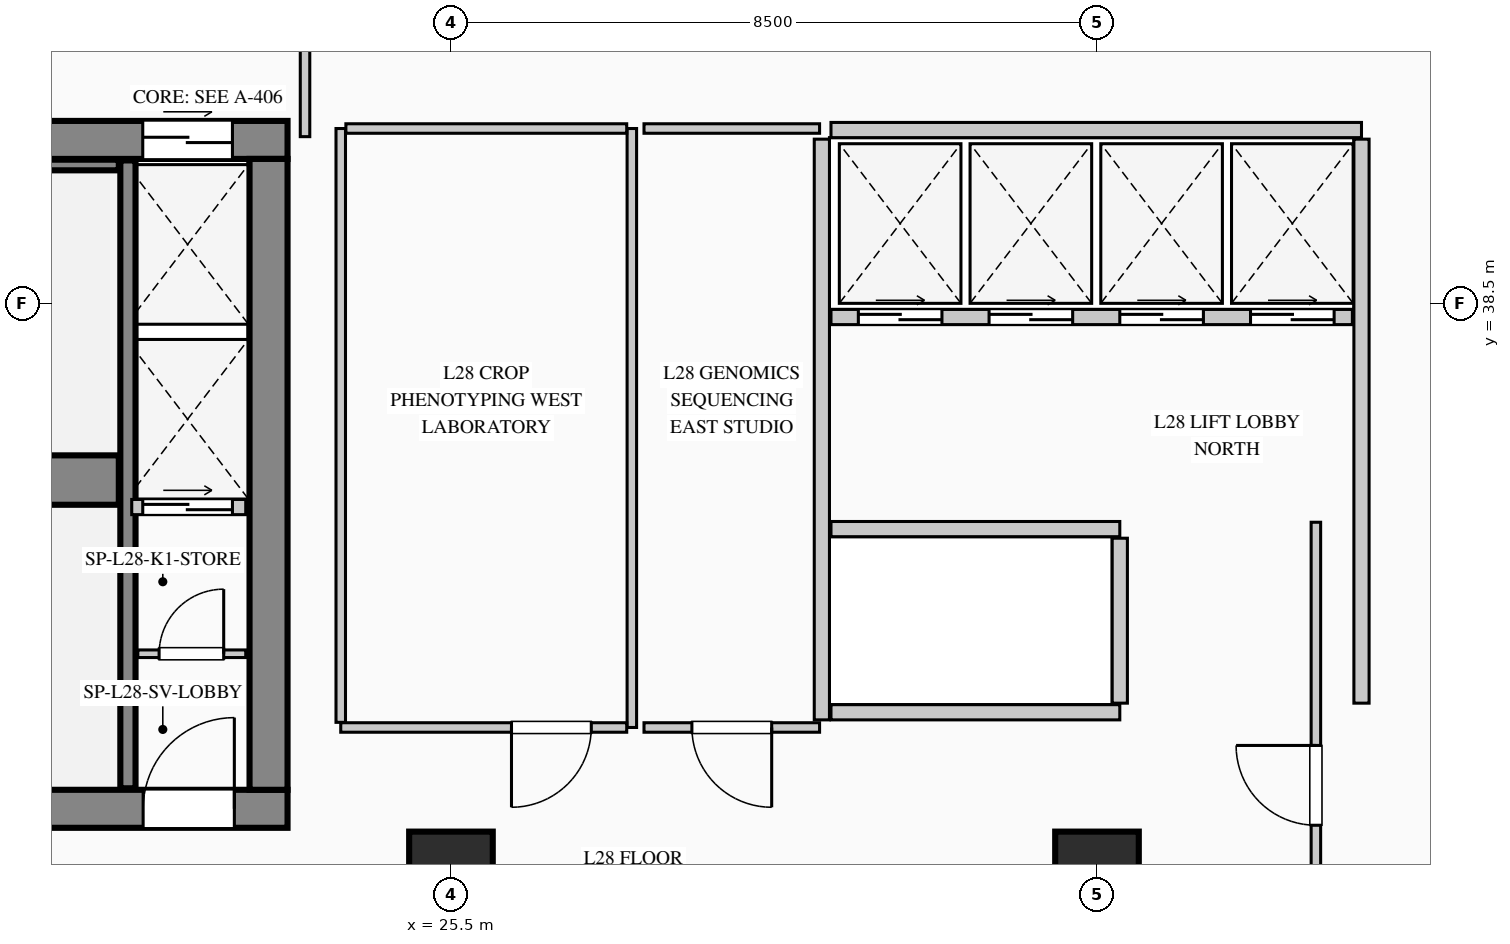
"""IFC4 building model, lengths in metres.
Left out: names, types, materials, properties, quantities, classifications, styles, units other than length and angle.
Written with IfcOpenShell. Run it as: python <this file> out.ifc"""

import sys

from ifc_helpers import new_model, si_unit, direction, frame, frame_2d, origin, origin_2d, place, context, subcontext, project, spatial, rectangle, extrude, element, fill, save


model = new_model("IFC4")
c1 = context("Model", 3, precision=1e-05, world=origin(), true_north=direction((0.0, 1.0)))
c2 = subcontext(c1, "Body", "Model", "MODEL_VIEW")
j1 = project(units=[si_unit("LENGTHUNIT", "METRE"), si_unit("PLANEANGLEUNIT", "RADIAN")], contexts=[c1])
p1 = place(None, origin())
s1 = spatial("IfcSite", under=j1, at=p1, CompositionType="ELEMENT")
p2 = place(p1, origin())
s2 = spatial("IfcBuilding", under=s1, at=p2, CompositionType="ELEMENT")
p3 = place(p2, frame((0.0, 0.0, 123.25)))
s3 = spatial("IfcBuildingStorey", under=s2, at=p3, CompositionType="ELEMENT", Elevation=123.25)
p4 = place(p3, frame((5.5, 40.65, 0.0), z_axis=(0.0, 0.0, 1.0), x_axis=(1.0, 0.0, 0.0)))
e1 = element("IfcWall", 1, at=p4, inside=s3, PredefinedType="SHEAR", context=c2, shape_type="SweptSolid", body=[
    extrude(rectangle(XDim=17.85, YDim=0.5, at=frame_2d((8.925, 0.0))), origin(), (0.0, 0.0, 1.0), 3.95),
])
p5 = place(p4, frame((15.945, 0.0, 0.0)))
e2 = element("IfcOpeningElement", 2, at=p5, cuts=e1, PredefinedType="OPENING", context=c2, shape_type="SweptSolid", body=[
    extrude(rectangle(XDim=1.18, YDim=2.25, at=frame_2d((0.59, 1.125))), frame((0.0, 0.26, 0.0), z_axis=(0.0, -1.0, 0.0), x_axis=(1.0, 0.0, 0.0)), (0.0, 0.0, 1.0), 0.52),
])
p6 = place(p3, frame((5.5, 31.85, 0.0), z_axis=(0.0, 0.0, 1.0), x_axis=(1.0, 0.0, 0.0)))
e3 = element("IfcWall", 3, at=p6, inside=s3, PredefinedType="SHEAR", context=c2, shape_type="SweptSolid", body=[
    extrude(rectangle(XDim=17.85, YDim=0.5, at=frame_2d((8.925, 0.0))), origin(), (0.0, 0.0, 1.0), 3.95),
])
p7 = place(p6, frame((3.15, 0.0, 0.0)))
e4 = element("IfcOpeningElement", 4, at=p7, cuts=e3, PredefinedType="OPENING", context=c2, shape_type="SweptSolid", body=[
    extrude(rectangle(XDim=1.2, YDim=2.2, at=frame_2d((0.6, 1.1))), frame((0.0, 0.26, 0.0), z_axis=(0.0, -1.0, 0.0), x_axis=(1.0, 0.0, 0.0)), (0.0, 0.0, 1.0), 0.52),
])
p8 = place(p6, frame((7.0, 0.0, 0.0)))
e5 = element("IfcOpeningElement", 5, at=p8, cuts=e3, PredefinedType="OPENING", context=c2, shape_type="SweptSolid", body=[
    extrude(rectangle(XDim=1.2, YDim=2.2, at=frame_2d((0.6, 1.1))), frame((0.0, 0.26, 0.0), z_axis=(0.0, -1.0, 0.0), x_axis=(1.0, 0.0, 0.0)), (0.0, 0.0, 1.0), 0.52),
])
p9 = place(p6, frame((8.85, 0.0, 0.0)))
e6 = element("IfcOpeningElement", 6, at=p9, cuts=e3, PredefinedType="OPENING", context=c2, shape_type="SweptSolid", body=[
    extrude(rectangle(XDim=1.15, YDim=2.2, at=frame_2d((0.575, 1.1))), frame((0.0, 0.26, 0.0), z_axis=(0.0, -1.0, 0.0), x_axis=(1.0, 0.0, 0.0)), (0.0, 0.0, 1.0), 0.52),
])
p10 = place(p6, frame((15.95, 0.0, 0.0)))
e7 = element("IfcOpeningElement", 7, at=p10, cuts=e3, PredefinedType="OPENING", context=c2, shape_type="SweptSolid", body=[
    extrude(rectangle(XDim=1.2, YDim=2.2, at=frame_2d((0.6, 1.1))), frame((0.0, 0.26, 0.0), z_axis=(0.0, -1.0, 0.0), x_axis=(1.0, 0.0, 0.0)), (0.0, 0.0, 1.0), 0.52),
])
p11 = place(p3, frame((23.1, 32.1, 0.0), z_axis=(0.0, 0.0, 1.0), x_axis=(0.0, 1.0, 0.0)))
e8 = element("IfcWall", 8, at=p11, inside=s3, PredefinedType="SHEAR", context=c2, shape_type="SweptSolid", body=[
    extrude(rectangle(XDim=8.3, YDim=0.5, at=frame_2d((4.15, 0.0))), origin(), (0.0, 0.0, 1.0), 3.95),
])
p12 = place(p3, frame((14.12, 36.175, 0.0), z_axis=(0.0, 0.0, 1.0), x_axis=(1.0, 0.0, 0.0)))
e9 = element("IfcWall", 9, at=p12, inside=s3, PredefinedType="SHEAR", context=c2, shape_type="SweptSolid", body=[
    extrude(rectangle(XDim=7.01, YDim=0.65, at=frame_2d((3.505, 0.0))), origin(), (0.0, 0.0, 1.0), 3.95),
])
p13 = place(p3, frame((21.25, 32.12, 0.0), z_axis=(0.0, 0.0, 1.0), x_axis=(0.0, 1.0, 0.0)))
e10 = element("IfcWall", 10, at=p13, inside=s3, PredefinedType="SHEAR", context=c2, shape_type="SweptSolid", body=[
    extrude(rectangle(XDim=8.26, YDim=0.2, at=frame_2d((4.13, 0.0))), origin(), (0.0, 0.0, 1.0), 3.95),
])
p14 = place(p3, frame((14.12, 40.32, 0.0), z_axis=(0.0, 0.0, 1.0), x_axis=(1.0, 0.0, 0.0)))
e11 = element("IfcWall", 11, at=p14, inside=s3, PredefinedType="SHEAR", context=c2, shape_type="SweptSolid", body=[
    extrude(rectangle(XDim=7.01, YDim=0.14, at=frame_2d((3.505, 0.0))), origin(), (0.0, 0.0, 1.0), 3.95),
])
for number, where, z_axis, x_axis in (
    (12, (25.5, 31.0, 0.0), (0.0, 0.0, 1.0), (1.0, 0.0, 0.0)),
    (13, (34.0, 31.0, 0.0), (0.0, 0.0, 1.0), (1.0, 0.0, 0.0)),
):
    element("IfcColumn", number, at=place(p3, frame(where, z_axis=z_axis, x_axis=x_axis)), inside=s3, PredefinedType="COLUMN", context=c2, shape_type="SweptSolid", body=[
        extrude(rectangle(XDim=1.1, YDim=1.1, at=origin_2d()), origin(), (0.0, 0.0, 1.0), 3.95),
    ])
p15 = place(p3, frame((21.38, 33.89, 0.0), z_axis=(0.0, 0.0, 1.0), x_axis=(1.0, 0.0, 0.0)))
e14 = element("IfcWall", 14, at=p15, inside=s3, PredefinedType="PARTITIONING", context=c2, shape_type="SweptSolid", body=[
    extrude(rectangle(XDim=1.42, YDim=0.1, at=frame_2d((0.71, 0.0))), origin(), (0.0, 0.0, 1.0), 3.69),
])
p16 = place(p15, frame((0.28, 0.0, 0.0)))
e15 = element("IfcOpeningElement", 15, at=p16, cuts=e14, PredefinedType="OPENING", context=c2, shape_type="SweptSolid", body=[
    extrude(rectangle(XDim=0.85, YDim=2.1, at=frame_2d((0.425, 1.05))), frame((0.0, 0.06, 0.0), z_axis=(0.0, -1.0, 0.0), x_axis=(1.0, 0.0, 0.0)), (0.0, 0.0, 1.0), 0.12),
])
p17 = place(p3, frame((21.3, 35.82, 0.0), z_axis=(0.0, 0.0, 1.0), x_axis=(1.0, 0.0, 0.0)))
e16 = element("IfcWall", 16, at=p17, inside=s3, PredefinedType="PARTITIONING", context=c2, shape_type="SweptSolid", body=[
    extrude(rectangle(XDim=1.5, YDim=0.2, at=frame_2d((0.75, 0.0))), origin(), (0.0, 0.0, 1.0), 3.69),
])
p18 = place(p17, frame((0.145, 0.0, 0.0)))
e17 = element("IfcOpeningElement", 17, at=p18, cuts=e16, PredefinedType="OPENING", context=c2, shape_type="SweptSolid", body=[
    extrude(rectangle(XDim=1.18, YDim=2.25, at=frame_2d((0.59, 1.125))), frame((0.0, 0.11, 0.0), z_axis=(0.0, -1.0, 0.0), x_axis=(1.0, 0.0, 0.0)), (0.0, 0.0, 1.0), 0.22),
])
p19 = place(p3, frame((30.38, 33.02, 0.0), z_axis=(0.0, 0.0, 1.0), x_axis=(0.0, 1.0, 0.0)))
e18 = element("IfcWall", 18, at=p19, inside=s3, PredefinedType="PARTITIONING", context=c2, shape_type="SweptSolid", body=[
    extrude(rectangle(XDim=7.64, YDim=0.2, at=frame_2d((3.82, 0.0))), origin(), (0.0, 0.0, 1.0), 3.69),
])
p20 = place(p3, frame((30.5, 40.78, 0.0), z_axis=(0.0, 0.0, 1.0), x_axis=(1.0, 0.0, 0.0)))
e19 = element("IfcWall", 19, at=p20, inside=s3, PredefinedType="PARTITIONING", context=c2, shape_type="SweptSolid", body=[
    extrude(rectangle(XDim=6.98, YDim=0.2, at=frame_2d((3.49, 0.0))), origin(), (0.0, 0.0, 1.0), 3.69),
])
p21 = place(p3, frame((37.48, 33.24, 0.0), z_axis=(0.0, 0.0, 1.0), x_axis=(0.0, 1.0, 0.0)))
e20 = element("IfcWall", 20, at=p21, inside=s3, PredefinedType="PARTITIONING", context=c2, shape_type="SweptSolid", body=[
    extrude(rectangle(XDim=7.42, YDim=0.2, at=frame_2d((3.71, 0.0))), origin(), (0.0, 0.0, 1.0), 3.69),
])
p22 = place(p3, frame((30.5, 38.32, 0.0), z_axis=(0.0, 0.0, 1.0), x_axis=(1.0, 0.0, 0.0)))
e21 = element("IfcWall", 21, at=p22, inside=s3, PredefinedType="PARTITIONING", context=c2, shape_type="SweptSolid", body=[
    extrude(rectangle(XDim=6.86, YDim=0.2, at=frame_2d((3.43, 0.0))), origin(), (0.0, 0.0, 1.0), 3.69),
])
p23 = place(p22, frame((0.36, 0.0, 0.0)))
e22 = element("IfcOpeningElement", 22, at=p23, cuts=e21, PredefinedType="OPENING", context=c2, shape_type="SweptSolid", body=[
    extrude(rectangle(XDim=1.1, YDim=2.2, at=frame_2d((0.55, 1.1))), frame((0.0, 0.11, 0.0), z_axis=(0.0, -1.0, 0.0), x_axis=(1.0, 0.0, 0.0)), (0.0, 0.0, 1.0), 0.22),
])
p24 = place(p22, frame((2.08, 0.0, 0.0)))
e23 = element("IfcOpeningElement", 23, at=p24, cuts=e21, PredefinedType="OPENING", context=c2, shape_type="SweptSolid", body=[
    extrude(rectangle(XDim=1.1, YDim=2.2, at=frame_2d((0.55, 1.1))), frame((0.0, 0.11, 0.0), z_axis=(0.0, -1.0, 0.0), x_axis=(1.0, 0.0, 0.0)), (0.0, 0.0, 1.0), 0.22),
])
p25 = place(p22, frame((3.8, 0.0, 0.0)))
e24 = element("IfcOpeningElement", 24, at=p25, cuts=e21, PredefinedType="OPENING", context=c2, shape_type="SweptSolid", body=[
    extrude(rectangle(XDim=1.1, YDim=2.2, at=frame_2d((0.55, 1.1))), frame((0.0, 0.11, 0.0), z_axis=(0.0, -1.0, 0.0), x_axis=(1.0, 0.0, 0.0)), (0.0, 0.0, 1.0), 0.22),
])
p26 = place(p22, frame((5.52, 0.0, 0.0)))
e25 = element("IfcOpeningElement", 25, at=p26, cuts=e21, PredefinedType="OPENING", context=c2, shape_type="SweptSolid", body=[
    extrude(rectangle(XDim=1.1, YDim=2.2, at=frame_2d((0.55, 1.1))), frame((0.0, 0.11, 0.0), z_axis=(0.0, -1.0, 0.0), x_axis=(1.0, 0.0, 0.0)), (0.0, 0.0, 1.0), 0.22),
])
for number, where, z_axis, x_axis in (
    (26, (30.5, 35.53, 0.0), (0.0, 0.0, 1.0), (1.0, 0.0, 0.0)),
    (27, (30.5, 33.12, 0.0), (0.0, 0.0, 1.0), (1.0, 0.0, 0.0)),
):
    element("IfcWall", number, at=place(p3, frame(where, z_axis=z_axis, x_axis=x_axis)), inside=s3, PredefinedType="PARTITIONING", context=c2, shape_type="SweptSolid", body=[
        extrude(rectangle(XDim=3.8, YDim=0.2, at=frame_2d((1.9, 0.0))), origin(), (0.0, 0.0, 1.0), 3.69),
    ])
p27 = place(p3, frame((34.3, 33.24, 0.0), z_axis=(0.0, 0.0, 1.0), x_axis=(0.0, 1.0, 0.0)))
e28 = element("IfcWall", 28, at=p27, inside=s3, PredefinedType="PARTITIONING", context=c2, shape_type="SweptSolid", body=[
    extrude(rectangle(XDim=2.17, YDim=0.2, at=frame_2d((1.085, 0.0))), origin(), (0.0, 0.0, 1.0), 3.69),
])
p28 = place(p3, frame((27.88, 40.8, 0.0), z_axis=(0.0, 0.0, 1.0), x_axis=(0.0, -1.0, 0.0)))
e29 = element("IfcWall", 29, at=p28, inside=s3, PredefinedType="PARTITIONING", context=c2, shape_type="SweptSolid", body=[
    extrude(rectangle(XDim=7.88, YDim=0.125, at=frame_2d((3.94, 0.0))), origin(), (0.0, 0.0, 1.0), 3.69),
])
p29 = place(p3, frame((27.812, 32.92, 0.0), z_axis=(0.0, 0.0, 1.0), x_axis=(-1.0, 0.0, 0.0)))
e30 = element("IfcWall", 30, at=p29, inside=s3, PredefinedType="PARTITIONING", context=c2, shape_type="SweptSolid", body=[
    extrude(rectangle(XDim=3.762, YDim=0.125, at=frame_2d((1.881, 0.0))), origin(), (0.0, 0.0, 1.0), 3.69),
])
p30 = place(p29, frame((0.466, 0.0, 0.0)))
e31 = element("IfcOpeningElement", 31, at=p30, cuts=e30, PredefinedType="OPENING", context=c2, shape_type="SweptSolid", body=[
    extrude(rectangle(XDim=1.05, YDim=2.15, at=frame_2d((0.525, 1.075))), frame((0.0, 0.073, 0.0), z_axis=(0.0, -1.0, 0.0), x_axis=(1.0, 0.0, 0.0)), (0.0, 0.0, 1.0), 0.145),
])
p31 = place(p3, frame((24.05, 32.988, 0.0), z_axis=(0.0, 0.0, 1.0), x_axis=(0.0, 1.0, 0.0)))
e32 = element("IfcWall", 32, at=p31, inside=s3, PredefinedType="PARTITIONING", context=c2, shape_type="SweptSolid", body=[
    extrude(rectangle(XDim=7.812, YDim=0.125, at=frame_2d((3.906, 0.0))), origin(), (0.0, 0.0, 1.0), 3.69),
])
p32 = place(p3, frame((24.117, 40.8, 0.0), z_axis=(0.0, 0.0, 1.0), x_axis=(1.0, 0.0, 0.0)))
e33 = element("IfcWall", 33, at=p32, inside=s3, PredefinedType="PARTITIONING", context=c2, shape_type="SweptSolid", body=[
    extrude(rectangle(XDim=3.695, YDim=0.125, at=frame_2d((1.848, 0.0))), origin(), (0.0, 0.0, 1.0), 3.69),
])
p33 = place(p3, frame((30.35, 32.92, 0.0), z_axis=(0.0, 0.0, 1.0), x_axis=(-1.0, 0.0, 0.0)))
e34 = element("IfcWall", 34, at=p33, inside=s3, PredefinedType="PARTITIONING", context=c2, shape_type="SweptSolid", body=[
    extrude(rectangle(XDim=2.31, YDim=0.125, at=frame_2d((1.155, 0.0))), origin(), (0.0, 0.0, 1.0), 3.69),
])
p34 = place(p33, frame((0.63, 0.0, 0.0)))
e35 = element("IfcOpeningElement", 35, at=p34, cuts=e34, PredefinedType="OPENING", context=c2, shape_type="SweptSolid", body=[
    extrude(rectangle(XDim=1.05, YDim=2.15, at=frame_2d((0.525, 1.075))), frame((0.0, 0.073, 0.0), z_axis=(0.0, -1.0, 0.0), x_axis=(1.0, 0.0, 0.0)), (0.0, 0.0, 1.0), 0.145),
])
p35 = place(p3, frame((28.04, 40.8, 0.0), z_axis=(0.0, 0.0, 1.0), x_axis=(1.0, 0.0, 0.0)))
e36 = element("IfcWall", 36, at=p35, inside=s3, PredefinedType="PARTITIONING", context=c2, shape_type="SweptSolid", body=[
    extrude(rectangle(XDim=2.31, YDim=0.125, at=frame_2d((1.155, 0.0))), origin(), (0.0, 0.0, 1.0), 3.69),
])
p36 = place(p3, frame((23.58, 40.693, 0.0), z_axis=(0.0, 0.0, 1.0), x_axis=(0.0, 1.0, 0.0)))
e37 = element("IfcWall", 37, at=p36, inside=s3, PredefinedType="PARTITIONING", context=c2, shape_type="SweptSolid", body=[
    extrude(rectangle(XDim=2.572, YDim=0.125, at=frame_2d((1.286, 0.0))), origin(), (0.0, 0.0, 1.0), 3.69),
])
p37 = place(p3, frame((36.88, 28.698, 0.0), z_axis=(0.0, 0.0, 1.0), x_axis=(0.0, 1.0, 0.0)))
e38 = element("IfcWall", 38, at=p37, inside=s3, PredefinedType="PARTITIONING", context=c2, shape_type="SweptSolid", body=[
    extrude(rectangle(XDim=6.923, YDim=0.125, at=frame_2d((3.461, 0.0))), origin(), (0.0, 0.0, 1.0), 3.69),
])
p38 = place(p37, frame((2.936, 0.0, 0.0)))
e39 = element("IfcOpeningElement", 39, at=p38, cuts=e38, PredefinedType="OPENING", context=c2, shape_type="SweptSolid", body=[
    extrude(rectangle(XDim=1.05, YDim=2.15, at=frame_2d((0.525, 1.075))), frame((0.0, 0.073, 0.0), z_axis=(0.0, -1.0, 0.0), x_axis=(1.0, 0.0, 0.0)), (0.0, 0.0, 1.0), 0.145),
])
p39 = place(p10, origin())
e40 = element("IfcDoor", 40, at=p39, inside=s3, OperationType="SINGLE_SWING_RIGHT", PredefinedType="DOOR", context=c2, shape_type="SweptSolid", body=[
    extrude(rectangle(XDim=1.2, YDim=2.2, at=frame_2d((0.6, 1.1))), frame((0.0, 0.025, 0.0), z_axis=(0.0, -1.0, 0.0), x_axis=(1.0, 0.0, 0.0)), (0.0, 0.0, 1.0), 0.05),
])
fill(e7, e40)
p40 = place(p16, origin())
e41 = element("IfcDoor", 41, at=p40, inside=s3, OperationType="SINGLE_SWING_RIGHT", PredefinedType="DOOR", context=c2, shape_type="SweptSolid", body=[
    extrude(rectangle(XDim=0.85, YDim=2.1, at=frame_2d((0.425, 1.05))), frame((0.0, 0.025, 0.0), z_axis=(0.0, -1.0, 0.0), x_axis=(1.0, 0.0, 0.0)), (0.0, 0.0, 1.0), 0.05),
])
fill(e15, e41)
p41 = place(p5, origin())
e42 = element("IfcDoor", 42, at=p41, inside=s3, OperationType="DOUBLE_DOOR_SLIDING", PredefinedType="DOOR", context=c2, shape_type="SweptSolid", body=[
    extrude(rectangle(XDim=1.18, YDim=2.25, at=frame_2d((0.59, 1.125))), frame((0.0, 0.025, 0.0), z_axis=(0.0, -1.0, 0.0), x_axis=(1.0, 0.0, 0.0)), (0.0, 0.0, 1.0), 0.05),
])
fill(e2, e42)
p42 = place(p18, origin())
e43 = element("IfcDoor", 43, at=p42, inside=s3, OperationType="DOUBLE_DOOR_SLIDING", PredefinedType="DOOR", context=c2, shape_type="SweptSolid", body=[
    extrude(rectangle(XDim=1.18, YDim=2.25, at=frame_2d((0.59, 1.125))), frame((0.0, 0.025, 0.0), z_axis=(0.0, -1.0, 0.0), x_axis=(1.0, 0.0, 0.0)), (0.0, 0.0, 1.0), 0.05),
])
fill(e17, e43)
p43 = place(p23, origin())
e44 = element("IfcDoor", 44, at=p43, inside=s3, OperationType="DOUBLE_DOOR_SLIDING", PredefinedType="DOOR", context=c2, shape_type="SweptSolid", body=[
    extrude(rectangle(XDim=1.1, YDim=2.2, at=frame_2d((0.55, 1.1))), frame((0.0, 0.025, 0.0), z_axis=(0.0, -1.0, 0.0), x_axis=(1.0, 0.0, 0.0)), (0.0, 0.0, 1.0), 0.05),
])
fill(e22, e44)
p44 = place(p24, origin())
e45 = element("IfcDoor", 45, at=p44, inside=s3, OperationType="DOUBLE_DOOR_SLIDING", PredefinedType="DOOR", context=c2, shape_type="SweptSolid", body=[
    extrude(rectangle(XDim=1.1, YDim=2.2, at=frame_2d((0.55, 1.1))), frame((0.0, 0.025, 0.0), z_axis=(0.0, -1.0, 0.0), x_axis=(1.0, 0.0, 0.0)), (0.0, 0.0, 1.0), 0.05),
])
fill(e23, e45)
p45 = place(p25, origin())
e46 = element("IfcDoor", 46, at=p45, inside=s3, OperationType="DOUBLE_DOOR_SLIDING", PredefinedType="DOOR", context=c2, shape_type="SweptSolid", body=[
    extrude(rectangle(XDim=1.1, YDim=2.2, at=frame_2d((0.55, 1.1))), frame((0.0, 0.025, 0.0), z_axis=(0.0, -1.0, 0.0), x_axis=(1.0, 0.0, 0.0)), (0.0, 0.0, 1.0), 0.05),
])
fill(e24, e46)
p46 = place(p26, origin())
e47 = element("IfcDoor", 47, at=p46, inside=s3, OperationType="DOUBLE_DOOR_SLIDING", PredefinedType="DOOR", context=c2, shape_type="SweptSolid", body=[
    extrude(rectangle(XDim=1.1, YDim=2.2, at=frame_2d((0.55, 1.1))), frame((0.0, 0.025, 0.0), z_axis=(0.0, -1.0, 0.0), x_axis=(1.0, 0.0, 0.0)), (0.0, 0.0, 1.0), 0.05),
])
fill(e25, e47)
p47 = place(p30, origin())
e48 = element("IfcDoor", 48, at=p47, inside=s3, OperationType="SINGLE_SWING_RIGHT", PredefinedType="DOOR", context=c2, shape_type="SweptSolid", body=[
    extrude(rectangle(XDim=1.05, YDim=2.15, at=frame_2d((0.525, 1.075))), frame((0.0, 0.025, 0.0), z_axis=(0.0, -1.0, 0.0), x_axis=(1.0, 0.0, 0.0)), (0.0, 0.0, 1.0), 0.05),
])
fill(e31, e48)
p48 = place(p34, origin())
e49 = element("IfcDoor", 49, at=p48, inside=s3, OperationType="SINGLE_SWING_LEFT", PredefinedType="DOOR", context=c2, shape_type="SweptSolid", body=[
    extrude(rectangle(XDim=1.05, YDim=2.15, at=frame_2d((0.525, 1.075))), frame((0.0, 0.025, 0.0), z_axis=(0.0, -1.0, 0.0), x_axis=(1.0, 0.0, 0.0)), (0.0, 0.0, 1.0), 0.05),
])
fill(e35, e49)
p49 = place(p38, origin())
e50 = element("IfcDoor", 50, at=p49, inside=s3, OperationType="SINGLE_SWING_RIGHT", PredefinedType="DOOR", context=c2, shape_type="SweptSolid", body=[
    extrude(rectangle(XDim=1.05, YDim=2.15, at=frame_2d((0.525, 1.075))), frame((0.0, 0.025, 0.0), z_axis=(0.0, -1.0, 0.0), x_axis=(1.0, 0.0, 0.0)), (0.0, 0.0, 1.0), 0.05),
])
fill(e39, e50)
save(model, sys.argv[1])
